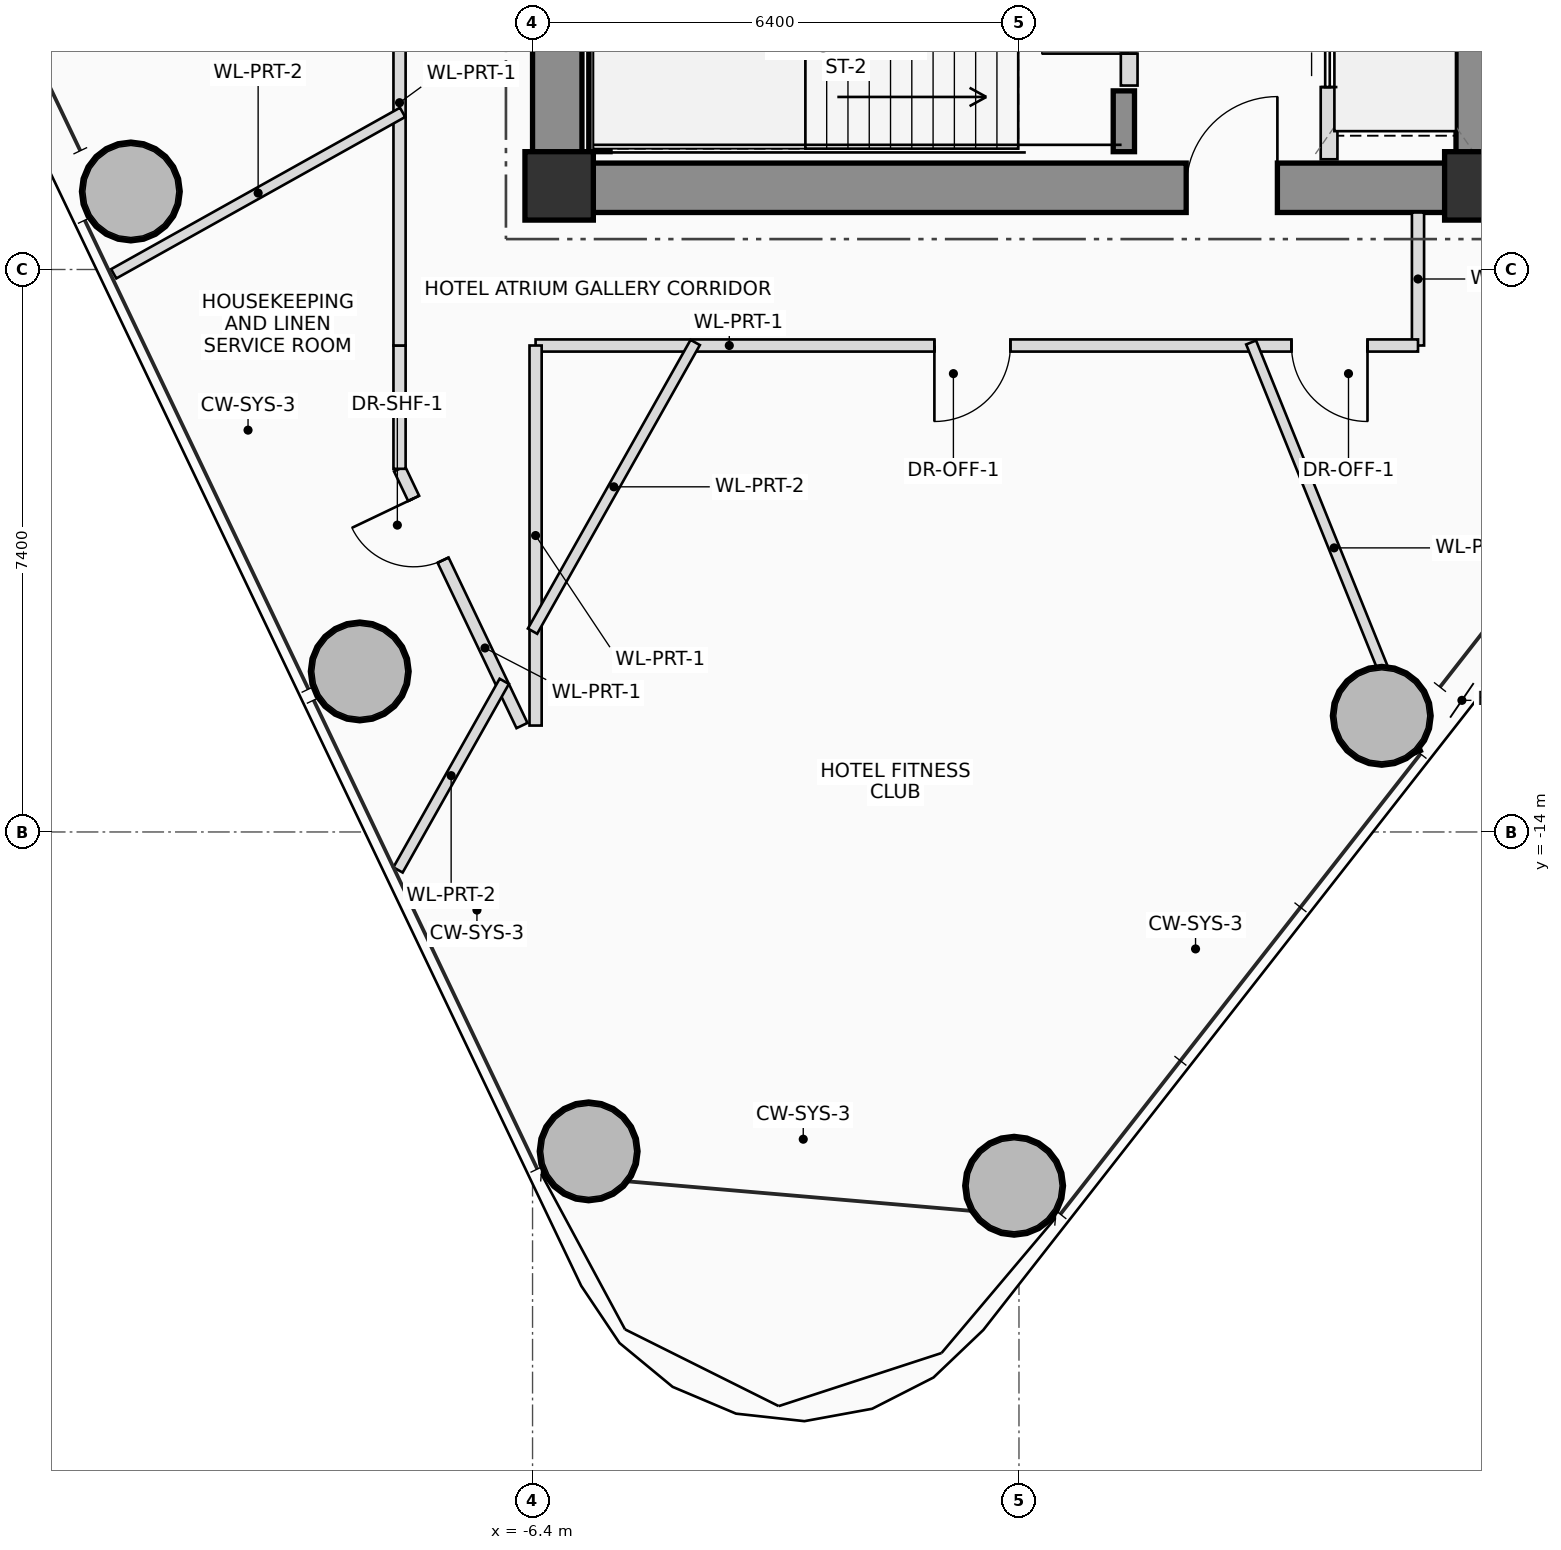
"""IFC4 building model, lengths in metres.
Left out: names, types, materials, properties, quantities, classifications, styles, units other than length and angle.
Written with IfcOpenShell. Run it as: python <this file> out.ifc"""

import sys

from ifc_helpers import new_model, si_unit, direction, frame, frame_2d, origin, origin_2d, place, context, subcontext, project, spatial, rectangle, hollow_circle, extrude, source, transform, mapped, element, fill, save


model = new_model("IFC4")
c1 = context("Model", 3, precision=1e-05, world=origin(), true_north=direction((0.0, 1.0)))
c2 = subcontext(c1, "Body", "Model", "MODEL_VIEW")
j1 = project(units=[si_unit("LENGTHUNIT", "METRE"), si_unit("PLANEANGLEUNIT", "RADIAN")], contexts=[c1])
p1 = place(None, origin())
s1 = spatial("IfcSite", under=j1, at=p1, CompositionType="ELEMENT")
p2 = place(p1, origin())
s2 = spatial("IfcBuilding", under=s1, at=p2, CompositionType="ELEMENT")
p3 = place(p2, frame((0.0, 0.0, 139.85)))
s3 = spatial("IfcBuildingStorey", under=s2, at=p3, CompositionType="ELEMENT", Elevation=139.85)
m1 = source(origin(), c2, "Body", "SweptSolid", [
    extrude(rectangle(XDim=0.9, YDim=0.9, at=origin_2d()), origin(), (0.0, 0.0, 1.0), 3.45),
])
for number, where, z_axis, x_axis in (
    (1, (-6.05, -5.5, 0.0), (0.0, 0.0, 1.0), (1.0, 0.0, 0.0)),
    (2, (6.05, -5.5, 0.0), (0.0, 0.0, 1.0), (1.0, 0.0, 0.0)),
):
    element("IfcColumn", number, at=place(p3, frame(where, z_axis=z_axis, x_axis=x_axis)), inside=s3, PredefinedType="COLUMN", context=c2, shape_type="MappedRepresentation", body=[
        mapped(m1, transform((0.0, 0.0, 0.0), scale=1.0)),
    ])
p4 = place(p3, frame((-6.4, -5.525, 0.0), z_axis=(0.0, 0.0, 1.0), x_axis=(1.0, 0.0, 0.0)))
e3 = element("IfcWall", 3, at=p4, inside=s3, PredefinedType="SHEAR", context=c2, shape_type="SweptSolid", body=[
    extrude(rectangle(XDim=12.8, YDim=0.65, at=frame_2d((6.4, 0.0))), origin(), (0.0, 0.0, 1.0), 3.45),
])
p5 = place(p4, frame((8.6, 0.0, 0.0)))
e4 = element("IfcOpeningElement", 4, at=p5, cuts=e3, PredefinedType="OPENING", context=c2, shape_type="SweptSolid", body=[
    extrude(rectangle(XDim=1.2, YDim=2.2, at=frame_2d((0.6, 1.1))), frame((0.0, 0.335, 0.0), z_axis=(0.0, -1.0, 0.0), x_axis=(1.0, 0.0, 0.0)), (0.0, 0.0, 1.0), 0.67),
])
p6 = place(p3, frame((6.075, -5.2, 0.0), z_axis=(0.0, 0.0, 1.0), x_axis=(0.0, 1.0, 0.0)))
e5 = element("IfcWall", 5, at=p6, inside=s3, PredefinedType="SHEAR", context=c2, shape_type="SweptSolid", body=[
    extrude(rectangle(XDim=10.4, YDim=0.65, at=frame_2d((5.2, 0.0))), origin(), (0.0, 0.0, 1.0), 3.45),
])
p7 = place(p3, frame((-6.075, -5.2, 0.0), z_axis=(0.0, 0.0, 1.0), x_axis=(0.0, 1.0, 0.0)))
e6 = element("IfcWall", 6, at=p7, inside=s3, PredefinedType="SHEAR", context=c2, shape_type="SweptSolid", body=[
    extrude(rectangle(XDim=3.45, YDim=0.65, at=frame_2d((1.725, 0.0))), origin(), (0.0, 0.0, 1.0), 3.45),
])
p8 = place(p3, frame((-5.52, -5.05, 0.0), z_axis=(0.0, 0.0, 1.0), x_axis=(0.0, 1.0, 0.0)))
e7 = element("IfcWall", 7, at=p8, inside=s3, PredefinedType="SHEAR", context=c2, shape_type="SweptSolid", body=[
    extrude(rectangle(XDim=2.75, YDim=0.28, at=frame_2d((1.375, 0.0))), origin(), (0.0, 0.0, 1.0), 3.45),
])
p9 = place(p3, frame((1.38, -5.05, 0.0), z_axis=(0.0, 0.0, 1.0), x_axis=(0.0, 1.0, 0.0)))
e8 = element("IfcWall", 8, at=p9, inside=s3, PredefinedType="SHEAR", context=c2, shape_type="SweptSolid", body=[
    extrude(rectangle(XDim=0.8, YDim=0.28, at=frame_2d((0.4, 0.0))), origin(), (0.0, 0.0, 1.0), 3.45),
])
m2 = source(origin(), c2, "Body", "SweptSolid", [
    extrude(hollow_circle(Radius=0.65, WallThickness=0.045, at=origin_2d()), origin(), (0.0, 0.0, 1.0), 3.45),
])
for number, where, z_axis, x_axis in (
    (9, (-0.064, -18.655, 0.0), (0.0, 0.0, 1.0), (1.0, 0.0, 0.0)),
    (10, (4.773, -12.472, 0.0), (0.0, 0.0, 1.0), (1.0, 0.0, 0.0)),
    (11, (-11.685, -5.573, 0.0), (0.0, 0.0, 1.0), (1.0, 0.0, 0.0)),
    (12, (-8.674, -11.888, 0.0), (0.0, 0.0, 1.0), (1.0, 0.0, 0.0)),
    (13, (-5.662, -18.202, 0.0), (0.0, 0.0, 1.0), (1.0, 0.0, 0.0)),
):
    element("IfcColumn", number, at=place(p3, frame(where, z_axis=z_axis, x_axis=x_axis)), inside=s3, PredefinedType="COLUMN", context=c2, shape_type="MappedRepresentation", body=[
        mapped(m2, transform((0.0, 0.0, 0.0), scale=1.0)),
    ])
p10 = place(p3, frame((1.45, -4.18, 0.0), z_axis=(0.0, 0.0, 1.0), x_axis=(0.0, 1.0, 0.0)))
e14 = element("IfcWall", 14, at=p10, inside=s3, PredefinedType="PLUMBINGWALL", context=c2, shape_type="SweptSolid", body=[
    extrude(rectangle(XDim=1.98, YDim=0.22, at=frame_2d((0.99, 0.0))), origin(), (0.0, 0.0, 1.0), 3.25),
])
p11 = place(p10, frame((0.42, 0.0, 0.0)))
e15 = element("IfcOpeningElement", 15, at=p11, cuts=e14, PredefinedType="OPENING", context=c2, shape_type="SweptSolid", body=[
    extrude(rectangle(XDim=1.15, YDim=2.15, at=frame_2d((0.575, 1.075))), frame((0.0, 0.12, 0.0), z_axis=(0.0, -1.0, 0.0), x_axis=(1.0, 0.0, 0.0)), (0.0, 0.0, 1.0), 0.24),
])
p12 = place(p3, frame((4.08, -5.15, 0.0), z_axis=(0.0, 0.0, 1.0), x_axis=(0.0, 1.0, 0.0)))
e16 = element("IfcWall", 16, at=p12, inside=s3, PredefinedType="PLUMBINGWALL", context=c2, shape_type="SweptSolid", body=[
    extrude(rectangle(XDim=2.95, YDim=0.22, at=frame_2d((1.475, 0.0))), origin(), (0.0, 0.0, 1.0), 3.25),
])
p13 = place(p12, frame((0.95, 0.0, 0.0)))
e17 = element("IfcOpeningElement", 17, at=p13, cuts=e16, PredefinedType="OPENING", context=c2, shape_type="SweptSolid", body=[
    extrude(rectangle(XDim=1.2, YDim=2.25, at=frame_2d((0.6, 1.125))), frame((0.0, 0.12, 0.0), z_axis=(0.0, -1.0, 0.0), x_axis=(1.0, 0.0, 0.0)), (0.0, 0.0, 1.0), 0.24),
])
p14 = place(p3, frame((-6.539, -12.6, 0.0), z_axis=(0.0, 0.0, 1.0), x_axis=(-0.430488060039, 0.902596271965, 0.0)))
e18 = element("IfcWall", 18, at=p14, inside=s3, PredefinedType="PARTITIONING", context=c2, shape_type="SweptSolid", body=[
    extrude(rectangle(XDim=3.742, YDim=0.16, at=frame_2d((1.871, 0.0))), origin(), (0.0, 0.0, 1.0), 2.605),
])
p15 = place(p14, frame((2.411, 0.0, 0.0)))
e19 = element("IfcOpeningElement", 19, at=p15, cuts=e18, PredefinedType="OPENING", context=c2, shape_type="SweptSolid", body=[
    extrude(rectangle(XDim=0.9, YDim=2.05, at=frame_2d((0.45, 1.025))), frame((0.0, 0.09, 0.0), z_axis=(0.0, -1.0, 0.0), x_axis=(1.0, 0.0, 0.0)), (0.0, 0.0, 1.0), 0.18),
])
p16 = place(p3, frame((-8.15, -9.222, 0.0), z_axis=(0.0, 0.0, 1.0), x_axis=(0.0, 1.0, 0.0)))
e20 = element("IfcWall", 20, at=p16, inside=s3, PredefinedType="PARTITIONING", context=c2, shape_type="SweptSolid", body=[
    extrude(rectangle(XDim=1.622, YDim=0.16, at=frame_2d((0.811, 0.0))), origin(), (0.0, 0.0, 1.0), 2.905),
])
p17 = place(p3, frame((-8.15, -7.6, 0.0), z_axis=(0.0, 0.0, 1.0), x_axis=(0.0, 1.0, 0.0)))
e21 = element("IfcWall", 21, at=p17, inside=s3, PredefinedType="PARTITIONING", context=c2, shape_type="SweptSolid", body=[
    extrude(rectangle(XDim=15.2, YDim=0.16, at=frame_2d((7.6, 0.0))), origin(), (0.0, 0.0, 1.0), 2.605),
])
p18 = place(p17, frame((6.538, 0.0, 0.0)))
e22 = element("IfcOpeningElement", 22, at=p18, cuts=e21, PredefinedType="OPENING", context=c2, shape_type="SweptSolid", body=[
    extrude(rectangle(XDim=1.05, YDim=2.2, at=frame_2d((0.525, 1.1))), frame((0.0, 0.09, 0.0), z_axis=(0.0, -1.0, 0.0), x_axis=(1.0, 0.0, 0.0)), (0.0, 0.0, 1.0), 0.18),
])
p19 = place(p17, frame((12.548, 0.0, 0.0)))
e23 = element("IfcOpeningElement", 23, at=p19, cuts=e21, PredefinedType="OPENING", context=c2, shape_type="SweptSolid", body=[
    extrude(rectangle(XDim=1.05, YDim=2.2, at=frame_2d((0.525, 1.1))), frame((0.0, 0.09, 0.0), z_axis=(0.0, -1.0, 0.0), x_axis=(1.0, 0.0, 0.0)), (0.0, 0.0, 1.0), 0.18),
])
p20 = place(p3, frame((5.25, -5.85, 0.0), z_axis=(0.0, 0.0, 1.0), x_axis=(0.0, -1.0, 0.0)))
e24 = element("IfcWall", 24, at=p20, inside=s3, PredefinedType="PARTITIONING", context=c2, shape_type="SweptSolid", body=[
    extrude(rectangle(XDim=1.75, YDim=0.16, at=frame_2d((0.875, 0.0))), origin(), (0.0, 0.0, 1.0), 3.25),
])
p21 = place(p3, frame((5.25, -7.6, 0.0), z_axis=(0.0, 0.0, 1.0), x_axis=(-1.0, 0.0, 0.0)))
e25 = element("IfcWall", 25, at=p21, inside=s3, PredefinedType="PARTITIONING", context=c2, shape_type="SweptSolid", body=[
    extrude(rectangle(XDim=11.61, YDim=0.16, at=frame_2d((5.805, 0.0))), origin(), (0.0, 0.0, 1.0), 2.605),
])
p22 = place(p21, frame((0.665, 0.0, 0.0)))
e26 = element("IfcOpeningElement", 26, at=p22, cuts=e25, PredefinedType="OPENING", context=c2, shape_type="SweptSolid", body=[
    extrude(rectangle(XDim=1.0, YDim=2.25, at=frame_2d((0.5, 1.125))), frame((0.0, 0.09, 0.0), z_axis=(0.0, -1.0, 0.0), x_axis=(1.0, 0.0, 0.0)), (0.0, 0.0, 1.0), 0.18),
])
p23 = place(p21, frame((5.363, 0.0, 0.0)))
e27 = element("IfcOpeningElement", 27, at=p23, cuts=e25, PredefinedType="OPENING", context=c2, shape_type="SweptSolid", body=[
    extrude(rectangle(XDim=1.0, YDim=2.25, at=frame_2d((0.5, 1.125))), frame((0.0, 0.09, 0.0), z_axis=(0.0, -1.0, 0.0), x_axis=(1.0, 0.0, 0.0)), (0.0, 0.0, 1.0), 0.18),
])
p24 = place(p3, frame((-6.36, -7.6, 0.0), z_axis=(0.0, 0.0, 1.0), x_axis=(0.0, -1.0, 0.0)))
e28 = element("IfcWall", 28, at=p24, inside=s3, PredefinedType="PARTITIONING", context=c2, shape_type="SweptSolid", body=[
    extrude(rectangle(XDim=5.0, YDim=0.16, at=frame_2d((2.5, 0.0))), origin(), (0.0, 0.0, 1.0), 3.25),
])
p25 = place(p3, frame((-8.11, -4.532, 0.0), z_axis=(0.0, 0.0, 1.0), x_axis=(-0.87291398503, -0.487874138216, 0.0)))
e29 = element("IfcWall", 29, at=p25, inside=s3, PredefinedType="PARTITIONING", context=c2, shape_type="SweptSolid", body=[
    extrude(rectangle(XDim=4.354, YDim=0.14, at=frame_2d((2.177, 0.0))), origin(), (0.0, 0.0, 1.0), 2.605),
])
p26 = place(p3, frame((-4.26, -7.56, 0.0), z_axis=(0.0, 0.0, 1.0), x_axis=(-0.490907196818, -0.871211870966, 0.0)))
e30 = element("IfcWall", 30, at=p26, inside=s3, PredefinedType="PARTITIONING", context=c2, shape_type="SweptSolid", body=[
    extrude(rectangle(XDim=4.36, YDim=0.14, at=frame_2d((2.18, 0.0))), origin(), (0.0, 0.0, 1.0), 2.605),
])
p27 = place(p3, frame((-6.772, -12.018, 0.0), z_axis=(0.0, 0.0, 1.0), x_axis=(-0.490867563053, -0.871234202464, 0.0)))
e31 = element("IfcWall", 31, at=p27, inside=s3, PredefinedType="PARTITIONING", context=c2, shape_type="SweptSolid", body=[
    extrude(rectangle(XDim=2.848, YDim=0.14, at=frame_2d((1.424, 0.0))), origin(), (0.0, 0.0, 1.0), 2.765),
])
p28 = place(p3, frame((3.054, -7.56, 0.0), z_axis=(0.0, 0.0, 1.0), x_axis=(0.374616076071, -0.927180023269, 0.0)))
e32 = element("IfcWall", 32, at=p28, inside=s3, PredefinedType="PARTITIONING", context=c2, shape_type="SweptSolid", body=[
    extrude(rectangle(XDim=5.83, YDim=0.14, at=frame_2d((2.915, 0.0))), origin(), (0.0, 0.0, 1.0), 2.605),
])
p29 = place(p5, origin())
e33 = element("IfcDoor", 33, at=p29, inside=s3, OperationType="SINGLE_SWING_RIGHT", PredefinedType="DOOR", context=c2, shape_type="SweptSolid", body=[
    extrude(rectangle(XDim=1.2, YDim=2.2, at=frame_2d((0.6, 1.1))), frame((0.0, 0.025, 0.0), z_axis=(0.0, -1.0, 0.0), x_axis=(1.0, 0.0, 0.0)), (0.0, 0.0, 1.0), 0.05),
])
fill(e4, e33)
p30 = place(p11, origin())
e34 = element("IfcDoor", 34, at=p30, inside=s3, OperationType="SINGLE_SWING_LEFT", PredefinedType="DOOR", context=c2, shape_type="SweptSolid", body=[
    extrude(rectangle(XDim=1.15, YDim=2.15, at=frame_2d((0.575, 1.075))), frame((0.0, 0.025, 0.0), z_axis=(0.0, -1.0, 0.0), x_axis=(1.0, 0.0, 0.0)), (0.0, 0.0, 1.0), 0.05),
])
fill(e15, e34)
p31 = place(p13, origin())
e35 = element("IfcDoor", 35, at=p31, inside=s3, OperationType="DOUBLE_DOOR_SLIDING", PredefinedType="DOOR", context=c2, shape_type="SweptSolid", body=[
    extrude(rectangle(XDim=1.2, YDim=2.25, at=frame_2d((0.6, 1.125))), frame((0.0, 0.025, 0.0), z_axis=(0.0, -1.0, 0.0), x_axis=(1.0, 0.0, 0.0)), (0.0, 0.0, 1.0), 0.05),
])
fill(e17, e35)
p32 = place(p15, origin())
e36 = element("IfcDoor", 36, at=p32, inside=s3, OperationType="SINGLE_SWING_RIGHT", PredefinedType="DOOR", context=c2, shape_type="SweptSolid", body=[
    extrude(rectangle(XDim=0.9, YDim=2.05, at=frame_2d((0.45, 1.025))), frame((0.0, 0.025, 0.0), z_axis=(0.0, -1.0, 0.0), x_axis=(1.0, 0.0, 0.0)), (0.0, 0.0, 1.0), 0.05),
])
fill(e19, e36)
p33 = place(p22, origin())
e37 = element("IfcDoor", 37, at=p33, inside=s3, OperationType="SINGLE_SWING_LEFT", PredefinedType="DOOR", context=c2, shape_type="SweptSolid", body=[
    extrude(rectangle(XDim=1.0, YDim=2.25, at=frame_2d((0.5, 1.125))), frame((0.0, 0.025, 0.0), z_axis=(0.0, -1.0, 0.0), x_axis=(1.0, 0.0, 0.0)), (0.0, 0.0, 1.0), 0.05),
])
fill(e26, e37)
p34 = place(p23, origin())
e38 = element("IfcDoor", 38, at=p34, inside=s3, OperationType="SINGLE_SWING_RIGHT", PredefinedType="DOOR", context=c2, shape_type="SweptSolid", body=[
    extrude(rectangle(XDim=1.0, YDim=2.25, at=frame_2d((0.5, 1.125))), frame((0.0, 0.025, 0.0), z_axis=(0.0, -1.0, 0.0), x_axis=(1.0, 0.0, 0.0)), (0.0, 0.0, 1.0), 0.05),
])
fill(e27, e38)
save(model, sys.argv[1])
